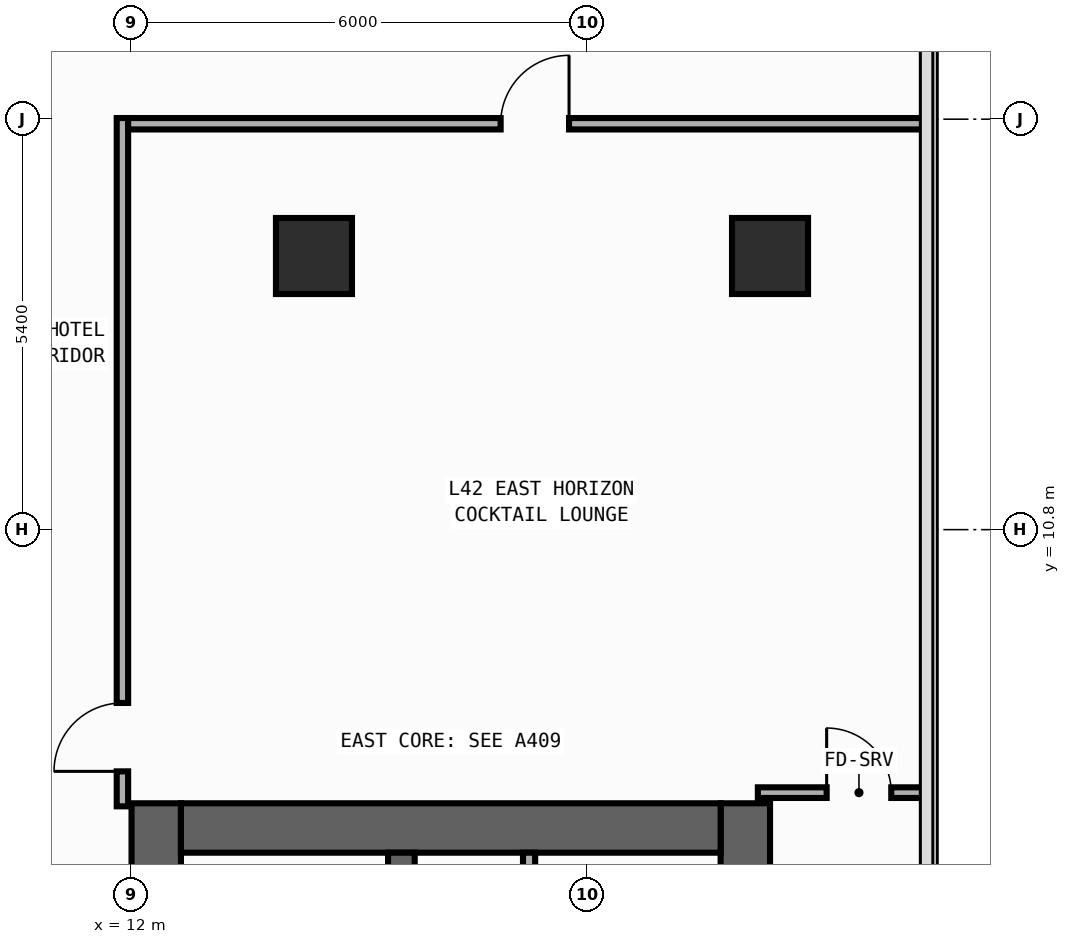
"""IFC4 building model, lengths in metres.
Left out: names, types, materials, properties, quantities, classifications, styles, units other than length and angle.
Written with IfcOpenShell. Run it as: python <this file> out.ifc"""

import sys

from ifc_helpers import new_model, si_unit, direction, frame, frame_2d, origin, origin_2d, place, context, subcontext, project, spatial, rectangle, extrude, element, fill, save


model = new_model("IFC4")
c1 = context("Model", 3, precision=1e-05, world=origin(), true_north=direction((0.0, 1.0)))
c2 = subcontext(c1, "Body", "Model", "MODEL_VIEW")
j1 = project(units=[si_unit("LENGTHUNIT", "METRE"), si_unit("PLANEANGLEUNIT", "RADIAN")], contexts=[c1])
p1 = place(None, origin())
s1 = spatial("IfcSite", under=j1, at=p1, CompositionType="ELEMENT")
p2 = place(p1, origin())
s2 = spatial("IfcBuilding", under=s1, at=p2, CompositionType="ELEMENT")
p3 = place(p2, frame((0.0, 0.0, 184.0)))
s3 = spatial("IfcBuildingStorey", under=s2, at=p3, CompositionType="ELEMENT", Elevation=184.0)
p4 = place(p3, frame((12.325, -19.8, 0.0), z_axis=(0.0, 0.0, 1.0), x_axis=(0.0, 1.0, 0.0)))
e1 = element("IfcWall", 1, at=p4, inside=s3, PredefinedType="SHEAR", context=c2, shape_type="SweptSolid", body=[
    extrude(rectangle(XDim=27.0, YDim=0.65, at=frame_2d((13.5, 0.0))), origin(), (0.0, 0.0, 1.0), 3.54),
])
p5 = place(p4, frame((23.05, 0.0, 0.0)))
e2 = element("IfcOpeningElement", 2, at=p5, cuts=e1, PredefinedType="OPENING", context=c2, shape_type="SweptSolid", body=[
    extrude(rectangle(XDim=1.1, YDim=2.2, at=frame_2d((0.55, 1.1))), frame((0.0, 0.335, 0.0), z_axis=(0.0, -1.0, 0.0), x_axis=(1.0, 0.0, 0.0)), (0.0, 0.0, 1.0), 0.67),
])
p6 = place(p4, frame((19.85, 0.0, 0.0)))
e3 = element("IfcOpeningElement", 3, at=p6, cuts=e1, PredefinedType="OPENING", context=c2, shape_type="SweptSolid", body=[
    extrude(rectangle(XDim=1.1, YDim=2.2, at=frame_2d((0.55, 1.1))), frame((0.0, 0.335, 0.0), z_axis=(0.0, -1.0, 0.0), x_axis=(1.0, 0.0, 0.0)), (0.0, 0.0, 1.0), 0.67),
])
p7 = place(p4, frame((16.65, 0.0, 0.0)))
e4 = element("IfcOpeningElement", 4, at=p7, cuts=e1, PredefinedType="OPENING", context=c2, shape_type="SweptSolid", body=[
    extrude(rectangle(XDim=1.1, YDim=2.2, at=frame_2d((0.55, 1.1))), frame((0.0, 0.335, 0.0), z_axis=(0.0, -1.0, 0.0), x_axis=(1.0, 0.0, 0.0)), (0.0, 0.0, 1.0), 0.67),
])
p8 = place(p4, frame((6.275, 0.0, 0.0)))
e5 = element("IfcOpeningElement", 5, at=p8, cuts=e1, PredefinedType="OPENING", context=c2, shape_type="SweptSolid", body=[
    extrude(rectangle(XDim=0.85, YDim=2.1, at=frame_2d((0.425, 1.05))), frame((0.0, 0.335, 0.0), z_axis=(0.0, -1.0, 0.0), x_axis=(1.0, 0.0, 0.0)), (0.0, 0.0, 1.0), 0.67),
])
p9 = place(p4, frame((8.575, 0.0, 0.0)))
e6 = element("IfcOpeningElement", 6, at=p9, cuts=e1, PredefinedType="OPENING", context=c2, shape_type="SweptSolid", body=[
    extrude(rectangle(XDim=0.85, YDim=2.1, at=frame_2d((0.425, 1.05))), frame((0.0, 0.335, 0.0), z_axis=(0.0, -1.0, 0.0), x_axis=(1.0, 0.0, 0.0)), (0.0, 0.0, 1.0), 0.67),
])
p10 = place(p4, frame((10.675, 0.0, 0.0)))
e7 = element("IfcOpeningElement", 7, at=p10, cuts=e1, PredefinedType="OPENING", context=c2, shape_type="SweptSolid", body=[
    extrude(rectangle(XDim=0.85, YDim=2.1, at=frame_2d((0.425, 1.05))), frame((0.0, 0.335, 0.0), z_axis=(0.0, -1.0, 0.0), x_axis=(1.0, 0.0, 0.0)), (0.0, 0.0, 1.0), 0.67),
])
p11 = place(p4, frame((12.725, 0.0, 0.0)))
e8 = element("IfcOpeningElement", 8, at=p11, cuts=e1, PredefinedType="OPENING", context=c2, shape_type="SweptSolid", body=[
    extrude(rectangle(XDim=1.15, YDim=2.2, at=frame_2d((0.575, 1.1))), frame((0.0, 0.335, 0.0), z_axis=(0.0, -1.0, 0.0), x_axis=(1.0, 0.0, 0.0)), (0.0, 0.0, 1.0), 0.67),
])
p12 = place(p4, frame((25.125, 0.0, 0.0)))
e9 = element("IfcOpeningElement", 9, at=p12, cuts=e1, PredefinedType="OPENING", context=c2, shape_type="SweptSolid", body=[
    extrude(rectangle(XDim=0.85, YDim=2.1, at=frame_2d((0.425, 1.05))), frame((0.0, 0.335, 0.0), z_axis=(0.0, -1.0, 0.0), x_axis=(1.0, 0.0, 0.0)), (0.0, 0.0, 1.0), 0.67),
])
p13 = place(p3, frame((20.075, -19.8, 0.0), z_axis=(0.0, 0.0, 1.0), x_axis=(0.0, 1.0, 0.0)))
e10 = element("IfcWall", 10, at=p13, inside=s3, PredefinedType="SHEAR", context=c2, shape_type="SweptSolid", body=[
    extrude(rectangle(XDim=27.0, YDim=0.65, at=frame_2d((13.5, 0.0))), origin(), (0.0, 0.0, 1.0), 3.54),
])
p14 = place(p3, frame((12.65, 6.875, 0.0), z_axis=(0.0, 0.0, 1.0), x_axis=(1.0, 0.0, 0.0)))
e11 = element("IfcWall", 11, at=p14, inside=s3, PredefinedType="SHEAR", context=c2, shape_type="SweptSolid", body=[
    extrude(rectangle(XDim=7.1, YDim=0.65, at=frame_2d((3.55, 0.0))), origin(), (0.0, 0.0, 1.0), 3.54),
])
p15 = place(p3, frame((15.55, -19.15, 0.0), z_axis=(0.0, 0.0, 1.0), x_axis=(0.0, 1.0, 0.0)))
e12 = element("IfcWall", 12, at=p15, inside=s3, PredefinedType="SHEAR", context=c2, shape_type="SweptSolid", body=[
    extrude(rectangle(XDim=25.7, YDim=0.35, at=frame_2d((12.85, 0.0))), origin(), (0.0, 0.0, 1.0), 3.54),
])
p16 = place(p15, frame((12.075, 0.0, 0.0)))
e13 = element("IfcOpeningElement", 13, at=p16, cuts=e12, PredefinedType="OPENING", context=c2, shape_type="SweptSolid", body=[
    extrude(rectangle(XDim=1.15, YDim=2.2, at=frame_2d((0.575, 1.1))), frame((0.0, 0.185, 0.0), z_axis=(0.0, -1.0, 0.0), x_axis=(1.0, 0.0, 0.0)), (0.0, 0.0, 1.0), 0.37),
])
p17 = place(p15, frame((24.475, 0.0, 0.0)))
e14 = element("IfcOpeningElement", 14, at=p17, cuts=e12, PredefinedType="OPENING", context=c2, shape_type="SweptSolid", body=[
    extrude(rectangle(XDim=0.85, YDim=2.1, at=frame_2d((0.425, 1.05))), frame((0.0, 0.185, 0.0), z_axis=(0.0, -1.0, 0.0), x_axis=(1.0, 0.0, 0.0)), (0.0, 0.0, 1.0), 0.37),
])
for number, where, z_axis, x_axis in (
    (15, (20.4, 14.4, 0.0), (0.0, 0.0, 1.0), (1.0, 0.0, 0.0)),
    (16, (14.4, 14.4, 0.0), (0.0, 0.0, 1.0), (1.0, 0.0, 0.0)),
):
    element("IfcColumn", number, at=place(p3, frame(where, z_axis=z_axis, x_axis=x_axis)), inside=s3, PredefinedType="COLUMN", context=c2, shape_type="SweptSolid", body=[
        extrude(rectangle(XDim=1.0, YDim=1.0, at=origin_2d()), origin(), (0.0, 0.0, 1.0), 3.8),
    ])
p18 = place(p3, frame((17.23, 4.17, 0.0), z_axis=(0.0, 0.0, 1.0), x_axis=(0.0, 1.0, 0.0)))
e17 = element("IfcWall", 17, at=p18, inside=s3, PredefinedType="PARTITIONING", context=c2, shape_type="SweptSolid", body=[
    extrude(rectangle(XDim=2.38, YDim=0.16, at=frame_2d((1.19, 0.0))), origin(), (0.0, 0.0, 1.0), 3.54),
])
p19 = place(p18, frame((0.46, 0.0, 0.0)))
e18 = element("IfcOpeningElement", 18, at=p19, cuts=e17, PredefinedType="OPENING", context=c2, shape_type="SweptSolid", body=[
    extrude(rectangle(XDim=0.85, YDim=2.1, at=frame_2d((0.425, 1.05))), frame((0.0, 0.09, 0.0), z_axis=(0.0, -1.0, 0.0), x_axis=(1.0, 0.0, 0.0)), (0.0, 0.0, 1.0), 0.18),
])
p20 = place(p3, frame((11.88, 7.16, 0.0), z_axis=(0.0, 0.0, 1.0), x_axis=(0.0, 1.0, 0.0)))
e19 = element("IfcWall", 19, at=p20, inside=s3, PredefinedType="PARTITIONING", context=c2, shape_type="SweptSolid", body=[
    extrude(rectangle(XDim=9.055, YDim=0.15, at=frame_2d((4.528, 0.0))), origin(), (0.0, 0.0, 1.0), 3.54),
])
p21 = place(p20, frame((0.46, 0.0, 0.0)))
e20 = element("IfcOpeningElement", 20, at=p21, cuts=e19, PredefinedType="OPENING", context=c2, shape_type="SweptSolid", body=[
    extrude(rectangle(XDim=0.9, YDim=2.15, at=frame_2d((0.45, 1.075))), frame((0.0, 0.085, 0.0), z_axis=(0.0, -1.0, 0.0), x_axis=(1.0, 0.0, 0.0)), (0.0, 0.0, 1.0), 0.17),
])
p22 = place(p3, frame((11.955, 16.14, 0.0), z_axis=(0.0, 0.0, 1.0), x_axis=(1.0, 0.0, 0.0)))
e21 = element("IfcWall", 21, at=p22, inside=s3, PredefinedType="PARTITIONING", context=c2, shape_type="SweptSolid", body=[
    extrude(rectangle(XDim=10.5, YDim=0.15, at=frame_2d((5.25, 0.0))), origin(), (0.0, 0.0, 1.0), 3.54),
])
p23 = place(p22, frame((4.901, 0.0, 0.0)))
e22 = element("IfcOpeningElement", 22, at=p23, cuts=e21, PredefinedType="OPENING", context=c2, shape_type="SweptSolid", body=[
    extrude(rectangle(XDim=0.9, YDim=2.15, at=frame_2d((0.45, 1.075))), frame((0.0, 0.085, 0.0), z_axis=(0.0, -1.0, 0.0), x_axis=(1.0, 0.0, 0.0)), (0.0, 0.0, 1.0), 0.17),
])
p24 = place(p3, frame((20.24, 7.34, 0.0), z_axis=(0.0, 0.0, 1.0), x_axis=(1.0, 0.0, 0.0)))
e23 = element("IfcWall", 23, at=p24, inside=s3, PredefinedType="PARTITIONING", context=c2, shape_type="SweptSolid", body=[
    extrude(rectangle(XDim=2.215, YDim=0.14, at=frame_2d((1.107, 0.0))), origin(), (0.0, 0.0, 1.0), 3.54),
])
p25 = place(p24, frame((0.905, 0.0, 0.0)))
e24 = element("IfcOpeningElement", 24, at=p25, cuts=e23, PredefinedType="OPENING", context=c2, shape_type="SweptSolid", body=[
    extrude(rectangle(XDim=0.85, YDim=2.1, at=frame_2d((0.425, 1.05))), frame((0.0, 0.08, 0.0), z_axis=(0.0, -1.0, 0.0), x_axis=(1.0, 0.0, 0.0)), (0.0, 0.0, 1.0), 0.16),
])
p26 = place(p21, origin())
e25 = element("IfcDoor", 25, at=p26, inside=s3, OperationType="SINGLE_SWING_LEFT", PredefinedType="DOOR", context=c2, shape_type="SweptSolid", body=[
    extrude(rectangle(XDim=0.9, YDim=2.15, at=frame_2d((0.45, 1.075))), frame((0.0, 0.025, 0.0), z_axis=(0.0, -1.0, 0.0), x_axis=(1.0, 0.0, 0.0)), (0.0, 0.0, 1.0), 0.05),
])
fill(e20, e25)
p27 = place(p23, origin())
e26 = element("IfcDoor", 26, at=p27, inside=s3, OperationType="SINGLE_SWING_RIGHT", PredefinedType="DOOR", context=c2, shape_type="SweptSolid", body=[
    extrude(rectangle(XDim=0.9, YDim=2.15, at=frame_2d((0.45, 1.075))), frame((0.0, 0.025, 0.0), z_axis=(0.0, -1.0, 0.0), x_axis=(1.0, 0.0, 0.0)), (0.0, 0.0, 1.0), 0.05),
])
fill(e22, e26)
p28 = place(p25, origin())
e27 = element("IfcDoor", 27, at=p28, inside=s3, OperationType="SINGLE_SWING_LEFT", PredefinedType="DOOR", context=c2, shape_type="SweptSolid", body=[
    extrude(rectangle(XDim=0.85, YDim=2.1, at=frame_2d((0.425, 1.05))), frame((0.0, 0.025, 0.0), z_axis=(0.0, -1.0, 0.0), x_axis=(1.0, 0.0, 0.0)), (0.0, 0.0, 1.0), 0.05),
])
fill(e24, e27)
save(model, sys.argv[1])
